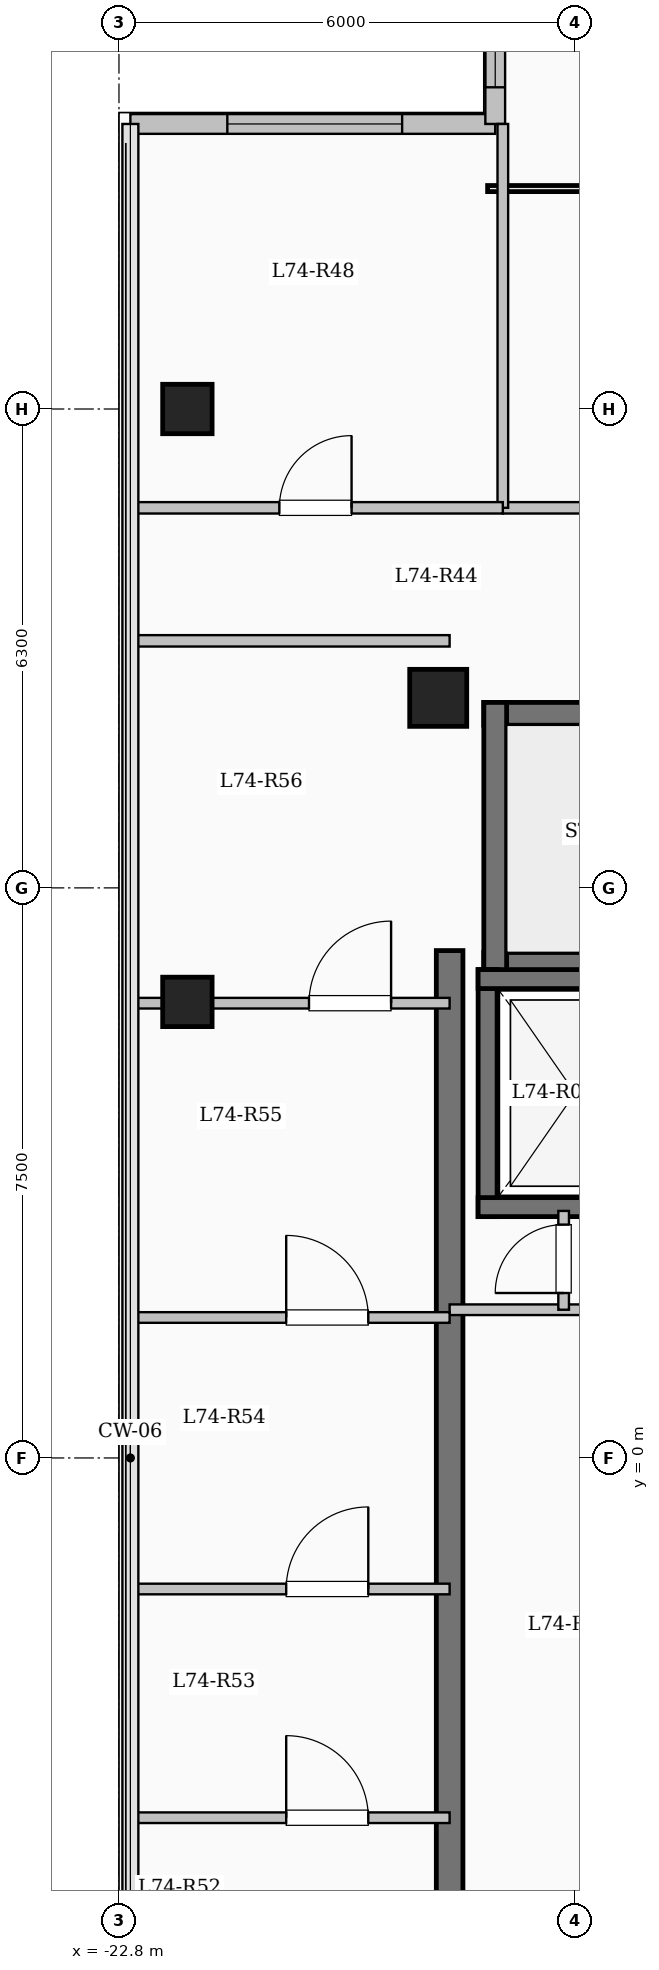
"""IFC4 building model, lengths in metres.
Left out: names, types, materials, properties, quantities, classifications, styles, units other than length and angle.
Written with IfcOpenShell. Run it as: python <this file> out.ifc"""

import sys

from ifc_helpers import new_model, si_unit, direction, frame, frame_2d, origin, origin_2d, place, context, subcontext, project, spatial, rectangle, extrude, element, fill, save


model = new_model("IFC4")
c1 = context("Model", 3, precision=1e-05, world=origin(), true_north=direction((0.0, 1.0)))
c2 = subcontext(c1, "Body", "Model", "MODEL_VIEW")
j1 = project(units=[si_unit("LENGTHUNIT", "METRE"), si_unit("PLANEANGLEUNIT", "RADIAN")], contexts=[c1])
p1 = place(None, origin())
s1 = spatial("IfcSite", under=j1, at=p1, CompositionType="ELEMENT")
p2 = place(p1, origin())
s2 = spatial("IfcBuilding", under=s1, at=p2, CompositionType="ELEMENT")
p3 = place(p2, frame((0.0, 0.0, 271.65)))
s3 = spatial("IfcBuildingStorey", under=s2, at=p3, CompositionType="ELEMENT", Elevation=271.65)
p4 = place(p3, frame((-18.6, 10.0, 0.0), z_axis=(0.0, 0.0, 1.0), x_axis=(1.0, 0.0, 0.0)))
e1 = element("IfcColumn", 1, at=p4, inside=s3, PredefinedType="COLUMN", context=c2, shape_type="SweptSolid", body=[
    extrude(rectangle(XDim=0.75, YDim=0.75, at=origin_2d()), origin(), (0.0, 0.0, 1.0), 4.65),
])
for number, where, z_axis, x_axis in (
    (2, (-21.9, -6.0, 0.0), (0.0, 0.0, 1.0), (1.0, 0.0, 0.0)),
    (3, (-21.9, 6.0, 0.0), (0.0, 0.0, 1.0), (1.0, 0.0, 0.0)),
    (4, (-21.9, 13.8, 0.0), (0.0, 0.0, 1.0), (1.0, 0.0, 0.0)),
):
    element("IfcColumn", number, at=place(p3, frame(where, z_axis=z_axis, x_axis=x_axis)), inside=s3, PredefinedType="COLUMN", context=c2, shape_type="SweptSolid", body=[
        extrude(rectangle(XDim=0.65, YDim=0.65, at=origin_2d()), origin(), (0.0, 0.0, 1.0), 4.65),
    ])
p5 = place(p3, frame((-22.65, 17.55, 0.0), z_axis=(0.0, 0.0, 1.0), x_axis=(1.0, 0.0, 0.0)))
e5 = element("IfcWall", 5, at=p5, inside=s3, PredefinedType="SOLIDWALL", context=c2, shape_type="SweptSolid", body=[
    extrude(rectangle(XDim=4.8, YDim=0.26, at=frame_2d((2.4, 0.0))), origin(), (0.0, 0.0, 1.0), 4.35),
])
p6 = place(p5, frame((1.275, 0.0, 0.85)))
e6 = element("IfcOpeningElement", 6, at=p6, cuts=e5, PredefinedType="OPENING", context=c2, shape_type="SweptSolid", body=[
    extrude(rectangle(XDim=2.3, YDim=2.2, at=frame_2d((1.15, 1.1))), frame((0.0, 0.14, 0.0), z_axis=(0.0, -1.0, 0.0), x_axis=(1.0, 0.0, 0.0)), (0.0, 0.0, 1.0), 0.28),
])
p7 = place(p3, frame((-17.85, 17.55, 0.0), z_axis=(0.0, 0.0, 1.0), x_axis=(0.0, 1.0, 0.0)))
e7 = element("IfcWall", 7, at=p7, inside=s3, PredefinedType="SOLIDWALL", context=c2, shape_type="SweptSolid", body=[
    extrude(rectangle(XDim=3.3, YDim=0.26, at=frame_2d((1.65, 0.0))), origin(), (0.0, 0.0, 1.0), 4.35),
])
p8 = place(p7, frame((0.482, 0.0, 0.85)))
e8 = element("IfcOpeningElement", 8, at=p8, cuts=e7, PredefinedType="OPENING", context=c2, shape_type="SweptSolid", body=[
    extrude(rectangle(XDim=2.3, YDim=2.2, at=frame_2d((1.15, 1.1))), frame((0.0, 0.14, 0.0), z_axis=(0.0, -1.0, 0.0), x_axis=(1.0, 0.0, 0.0)), (0.0, 0.0, 1.0), 0.28),
])
p9 = place(p3, frame((-18.0, 9.79, 0.0), z_axis=(0.0, 0.0, 1.0), x_axis=(1.0, 0.0, 0.0)))
e9 = element("IfcWall", 9, at=p9, inside=s3, PredefinedType="SHEAR", context=c2, shape_type="SweptSolid", body=[
    extrude(rectangle(XDim=8.0, YDim=0.3, at=frame_2d((4.0, 0.0))), origin(), (0.0, 0.0, 1.0), 4.65),
])
p10 = place(p3, frame((-18.0, 6.5, 0.0), z_axis=(0.0, 0.0, 1.0), x_axis=(1.0, 0.0, 0.0)))
e10 = element("IfcWall", 10, at=p10, inside=s3, PredefinedType="SHEAR", context=c2, shape_type="SweptSolid", body=[
    extrude(rectangle(XDim=8.0, YDim=0.3, at=frame_2d((4.0, 0.0))), origin(), (0.0, 0.0, 1.0), 4.65),
])
p11 = place(p10, frame((6.45, 0.0, 0.0)))
e11 = element("IfcOpeningElement", 11, at=p11, cuts=e10, PredefinedType="OPENING", context=c2, shape_type="SweptSolid", body=[
    extrude(rectangle(XDim=1.0, YDim=2.15, at=frame_2d((0.5, 1.075))), frame((0.0, 0.16, 0.0), z_axis=(0.0, -1.0, 0.0), x_axis=(1.0, 0.0, 0.0)), (0.0, 0.0, 1.0), 0.32),
])
p12 = place(p3, frame((-17.85, 6.35, 0.0), z_axis=(0.0, 0.0, 1.0), x_axis=(0.0, 1.0, 0.0)))
e12 = element("IfcWall", 12, at=p12, inside=s3, PredefinedType="SHEAR", context=c2, shape_type="SweptSolid", body=[
    extrude(rectangle(XDim=3.59, YDim=0.3, at=frame_2d((1.795, 0.0))), origin(), (0.0, 0.0, 1.0), 4.65),
])
p13 = place(p3, frame((-17.95, 3.175, 0.0), z_axis=(0.0, 0.0, 1.0), x_axis=(0.0, 1.0, 0.0)))
e13 = element("IfcWall", 13, at=p13, inside=s3, PredefinedType="SHEAR", context=c2, shape_type="SweptSolid", body=[
    extrude(rectangle(XDim=3.25, YDim=0.25, at=frame_2d((1.625, 0.0))), origin(), (0.0, 0.0, 1.0), 4.65),
])
for number, where, z_axis, x_axis in (
    (14, (-18.075, 3.3, 0.0), (0.0, 0.0, 1.0), (1.0, 0.0, 0.0)),
    (15, (-18.075, 6.3, 0.0), (0.0, 0.0, 1.0), (1.0, 0.0, 0.0)),
):
    element("IfcWall", number, at=place(p3, frame(where, z_axis=z_axis, x_axis=x_axis)), inside=s3, PredefinedType="SHEAR", context=c2, shape_type="SweptSolid", body=[
        extrude(rectangle(XDim=2.55, YDim=0.25, at=frame_2d((1.275, 0.0))), origin(), (0.0, 0.0, 1.0), 4.65),
    ])
p14 = place(p3, frame((-18.45, -7.375, 0.0), z_axis=(0.0, 0.0, 1.0), x_axis=(0.0, 1.0, 0.0)))
e16 = element("IfcWall", 16, at=p14, inside=s3, PredefinedType="SHEAR", context=c2, shape_type="SweptSolid", body=[
    extrude(rectangle(XDim=14.05, YDim=0.35, at=frame_2d((7.025, 0.0))), origin(), (0.0, 0.0, 1.0), 4.65),
])
p15 = place(p3, frame((-18.45, 1.95, 0.0), z_axis=(0.0, 0.0, 1.0), x_axis=(1.0, 0.0, 0.0)))
e17 = element("IfcWall", 17, at=p15, inside=s3, PredefinedType="PARTITIONING", context=c2, shape_type="SweptSolid", body=[
    extrude(rectangle(XDim=3.15, YDim=0.14, at=frame_2d((1.575, 0.0))), origin(), (0.0, 0.0, 1.0), 4.35),
])
p16 = place(p15, frame((1.9, 0.0, 0.0)))
e18 = element("IfcOpeningElement", 18, at=p16, cuts=e17, PredefinedType="OPENING", context=c2, shape_type="SweptSolid", body=[
    extrude(rectangle(XDim=0.9, YDim=2.08, at=frame_2d((0.45, 1.04))), frame((0.0, 0.08, 0.0), z_axis=(0.0, -1.0, 0.0), x_axis=(1.0, 0.0, 0.0)), (0.0, 0.0, 1.0), 0.16),
])
p17 = place(p3, frame((-16.95, 1.95, 0.0), z_axis=(0.0, 0.0, 1.0), x_axis=(0.0, 1.0, 0.0)))
e19 = element("IfcWall", 19, at=p17, inside=s3, PredefinedType="PARTITIONING", context=c2, shape_type="SweptSolid", body=[
    extrude(rectangle(XDim=1.3, YDim=0.14, at=frame_2d((0.65, 0.0))), origin(), (0.0, 0.0, 1.0), 4.35),
])
p18 = place(p17, frame((0.22, 0.0, 0.0)))
e20 = element("IfcOpeningElement", 20, at=p18, cuts=e19, PredefinedType="OPENING", context=c2, shape_type="SweptSolid", body=[
    extrude(rectangle(XDim=0.9, YDim=2.08, at=frame_2d((0.45, 1.04))), frame((0.0, 0.08, 0.0), z_axis=(0.0, -1.0, 0.0), x_axis=(1.0, 0.0, 0.0)), (0.0, 0.0, 1.0), 0.16),
])
p19 = place(p3, frame((-17.75, 12.5, 0.0), z_axis=(0.0, 0.0, 1.0), x_axis=(1.0, 0.0, 0.0)))
e21 = element("IfcWall", 21, at=p19, inside=s3, PredefinedType="PARTITIONING", context=c2, shape_type="SweptSolid", body=[
    extrude(rectangle(XDim=13.9, YDim=0.15, at=frame_2d((6.95, 0.0))), origin(), (0.0, 0.0, 1.0), 4.35),
])
p20 = place(p19, frame((1.2, 0.0, 0.0)))
e22 = element("IfcOpeningElement", 22, at=p20, cuts=e21, PredefinedType="OPENING", context=c2, shape_type="SweptSolid", body=[
    extrude(rectangle(XDim=1.2, YDim=2.15, at=frame_2d((0.6, 1.075))), frame((0.0, 0.085, 0.0), z_axis=(0.0, -1.0, 0.0), x_axis=(1.0, 0.0, 0.0)), (0.0, 0.0, 1.0), 0.17),
])
p21 = place(p19, frame((7.931, 0.0, 0.0)))
e23 = element("IfcOpeningElement", 23, at=p21, cuts=e21, PredefinedType="OPENING", context=c2, shape_type="SweptSolid", body=[
    extrude(rectangle(XDim=1.08, YDim=2.15, at=frame_2d((0.54, 1.075))), frame((0.0, 0.085, 0.0), z_axis=(0.0, -1.0, 0.0), x_axis=(1.0, 0.0, 0.0)), (0.0, 0.0, 1.0), 0.17),
])
p22 = place(p3, frame((-22.68, 10.75, 0.0), z_axis=(0.0, 0.0, 1.0), x_axis=(1.0, 0.0, 0.0)))
e24 = element("IfcWall", 24, at=p22, inside=s3, PredefinedType="PARTITIONING", context=c2, shape_type="SweptSolid", body=[
    extrude(rectangle(XDim=4.23, YDim=0.15, at=frame_2d((2.115, 0.0))), origin(), (0.0, 0.0, 1.0), 4.35),
])
p23 = place(p3, frame((-17.75, 12.5, 0.0), z_axis=(0.0, 0.0, 1.0), x_axis=(0.0, 1.0, 0.0)))
e25 = element("IfcWall", 25, at=p23, inside=s3, PredefinedType="PARTITIONING", context=c2, shape_type="SweptSolid", body=[
    extrude(rectangle(XDim=5.05, YDim=0.14, at=frame_2d((2.525, 0.0))), origin(), (0.0, 0.0, 1.0), 4.35),
])
p24 = place(p3, frame((-22.68, 12.5, 0.0), z_axis=(0.0, 0.0, 1.0), x_axis=(1.0, 0.0, 0.0)))
e26 = element("IfcWall", 26, at=p24, inside=s3, PredefinedType="PARTITIONING", context=c2, shape_type="SweptSolid", body=[
    extrude(rectangle(XDim=4.93, YDim=0.15, at=frame_2d((2.465, 0.0))), origin(), (0.0, 0.0, 1.0), 4.35),
])
p25 = place(p24, frame((1.99, 0.0, 0.0)))
e27 = element("IfcOpeningElement", 27, at=p25, cuts=e26, PredefinedType="OPENING", context=c2, shape_type="SweptSolid", body=[
    extrude(rectangle(XDim=0.95, YDim=2.15, at=frame_2d((0.475, 1.075))), frame((0.0, 0.085, 0.0), z_axis=(0.0, -1.0, 0.0), x_axis=(1.0, 0.0, 0.0)), (0.0, 0.0, 1.0), 0.17),
])
p26 = place(p3, frame((-22.68, -4.733, 0.0), z_axis=(0.0, 0.0, 1.0), x_axis=(1.0, 0.0, 0.0)))
e28 = element("IfcWall", 28, at=p26, inside=s3, PredefinedType="PARTITIONING", context=c2, shape_type="SweptSolid", body=[
    extrude(rectangle(XDim=4.23, YDim=0.14, at=frame_2d((2.115, 0.0))), origin(), (0.0, 0.0, 1.0), 4.35),
])
p27 = place(p26, frame((2.08, 0.0, 0.0)))
e29 = element("IfcOpeningElement", 29, at=p27, cuts=e28, PredefinedType="OPENING", context=c2, shape_type="SweptSolid", body=[
    extrude(rectangle(XDim=1.08, YDim=2.15, at=frame_2d((0.54, 1.075))), frame((0.0, 0.08, 0.0), z_axis=(0.0, -1.0, 0.0), x_axis=(1.0, 0.0, 0.0)), (0.0, 0.0, 1.0), 0.16),
])
p28 = place(p3, frame((-22.68, -1.724, 0.0), z_axis=(0.0, 0.0, 1.0), x_axis=(1.0, 0.0, 0.0)))
e30 = element("IfcWall", 30, at=p28, inside=s3, PredefinedType="PARTITIONING", context=c2, shape_type="SweptSolid", body=[
    extrude(rectangle(XDim=4.23, YDim=0.14, at=frame_2d((2.115, 0.0))), origin(), (0.0, 0.0, 1.0), 4.35),
])
p29 = place(p28, frame((2.08, 0.0, 0.0)))
e31 = element("IfcOpeningElement", 31, at=p29, cuts=e30, PredefinedType="OPENING", context=c2, shape_type="SweptSolid", body=[
    extrude(rectangle(XDim=1.08, YDim=2.15, at=frame_2d((0.54, 1.075))), frame((0.0, 0.08, 0.0), z_axis=(0.0, -1.0, 0.0), x_axis=(1.0, 0.0, 0.0)), (0.0, 0.0, 1.0), 0.16),
])
p30 = place(p3, frame((-22.68, 1.848, 0.0), z_axis=(0.0, 0.0, 1.0), x_axis=(1.0, 0.0, 0.0)))
e32 = element("IfcWall", 32, at=p30, inside=s3, PredefinedType="PARTITIONING", context=c2, shape_type="SweptSolid", body=[
    extrude(rectangle(XDim=4.23, YDim=0.14, at=frame_2d((2.115, 0.0))), origin(), (0.0, 0.0, 1.0), 4.35),
])
p31 = place(p30, frame((2.08, 0.0, 0.0)))
e33 = element("IfcOpeningElement", 33, at=p31, cuts=e32, PredefinedType="OPENING", context=c2, shape_type="SweptSolid", body=[
    extrude(rectangle(XDim=1.08, YDim=2.15, at=frame_2d((0.54, 1.075))), frame((0.0, 0.08, 0.0), z_axis=(0.0, -1.0, 0.0), x_axis=(1.0, 0.0, 0.0)), (0.0, 0.0, 1.0), 0.16),
])
p32 = place(p3, frame((-22.68, 5.983, 0.0), z_axis=(0.0, 0.0, 1.0), x_axis=(1.0, 0.0, 0.0)))
e34 = element("IfcWall", 34, at=p32, inside=s3, PredefinedType="PARTITIONING", context=c2, shape_type="SweptSolid", body=[
    extrude(rectangle(XDim=4.23, YDim=0.14, at=frame_2d((2.115, 0.0))), origin(), (0.0, 0.0, 1.0), 3.935),
])
p33 = place(p32, frame((2.38, 0.0, 0.0)))
e35 = element("IfcOpeningElement", 35, at=p33, cuts=e34, PredefinedType="OPENING", context=c2, shape_type="SweptSolid", body=[
    extrude(rectangle(XDim=1.08, YDim=2.15, at=frame_2d((0.54, 1.075))), frame((0.0, 0.08, 0.0), z_axis=(0.0, -1.0, 0.0), x_axis=(1.0, 0.0, 0.0)), (0.0, 0.0, 1.0), 0.16),
])
p34 = place(p6, origin())
e36 = element("IfcWindow", 36, at=p34, inside=s3, PartitioningType="SINGLE_PANEL", PredefinedType="WINDOW", context=c2, shape_type="SweptSolid", body=[
    extrude(rectangle(XDim=2.3, YDim=2.2, at=frame_2d((1.15, 1.1))), frame((0.0, 0.03, 0.0), z_axis=(0.0, -1.0, 0.0), x_axis=(1.0, 0.0, 0.0)), (0.0, 0.0, 1.0), 0.06),
])
fill(e6, e36)
p35 = place(p8, origin())
e37 = element("IfcWindow", 37, at=p35, inside=s3, PartitioningType="SINGLE_PANEL", PredefinedType="WINDOW", context=c2, shape_type="SweptSolid", body=[
    extrude(rectangle(XDim=2.3, YDim=2.2, at=frame_2d((1.15, 1.1))), frame((0.0, 0.03, 0.0), z_axis=(0.0, -1.0, 0.0), x_axis=(1.0, 0.0, 0.0)), (0.0, 0.0, 1.0), 0.06),
])
fill(e8, e37)
p36 = place(p18, origin())
e38 = element("IfcDoor", 38, at=p36, inside=s3, OperationType="SINGLE_SWING_LEFT", PredefinedType="DOOR", context=c2, shape_type="SweptSolid", body=[
    extrude(rectangle(XDim=0.9, YDim=2.08, at=frame_2d((0.45, 1.04))), frame((0.0, 0.025, 0.0), z_axis=(0.0, -1.0, 0.0), x_axis=(1.0, 0.0, 0.0)), (0.0, 0.0, 1.0), 0.05),
])
fill(e20, e38)
p37 = place(p25, origin())
e39 = element("IfcDoor", 39, at=p37, inside=s3, OperationType="SINGLE_SWING_RIGHT", PredefinedType="DOOR", context=c2, shape_type="SweptSolid", body=[
    extrude(rectangle(XDim=0.95, YDim=2.15, at=frame_2d((0.475, 1.075))), frame((0.0, 0.025, 0.0), z_axis=(0.0, -1.0, 0.0), x_axis=(1.0, 0.0, 0.0)), (0.0, 0.0, 1.0), 0.05),
])
fill(e27, e39)
p38 = place(p27, origin())
e40 = element("IfcDoor", 40, at=p38, inside=s3, OperationType="SINGLE_SWING_LEFT", PredefinedType="DOOR", context=c2, shape_type="SweptSolid", body=[
    extrude(rectangle(XDim=1.08, YDim=2.15, at=frame_2d((0.54, 1.075))), frame((0.0, 0.025, 0.0), z_axis=(0.0, -1.0, 0.0), x_axis=(1.0, 0.0, 0.0)), (0.0, 0.0, 1.0), 0.05),
])
fill(e29, e40)
p39 = place(p29, origin())
e41 = element("IfcDoor", 41, at=p39, inside=s3, OperationType="SINGLE_SWING_RIGHT", PredefinedType="DOOR", context=c2, shape_type="SweptSolid", body=[
    extrude(rectangle(XDim=1.08, YDim=2.15, at=frame_2d((0.54, 1.075))), frame((0.0, 0.025, 0.0), z_axis=(0.0, -1.0, 0.0), x_axis=(1.0, 0.0, 0.0)), (0.0, 0.0, 1.0), 0.05),
])
fill(e31, e41)
p40 = place(p31, origin())
e42 = element("IfcDoor", 42, at=p40, inside=s3, OperationType="SINGLE_SWING_LEFT", PredefinedType="DOOR", context=c2, shape_type="SweptSolid", body=[
    extrude(rectangle(XDim=1.08, YDim=2.15, at=frame_2d((0.54, 1.075))), frame((0.0, 0.025, 0.0), z_axis=(0.0, -1.0, 0.0), x_axis=(1.0, 0.0, 0.0)), (0.0, 0.0, 1.0), 0.05),
])
fill(e33, e42)
p41 = place(p33, origin())
e43 = element("IfcDoor", 43, at=p41, inside=s3, OperationType="SINGLE_SWING_RIGHT", PredefinedType="DOOR", context=c2, shape_type="SweptSolid", body=[
    extrude(rectangle(XDim=1.08, YDim=2.15, at=frame_2d((0.54, 1.075))), frame((0.0, 0.025, 0.0), z_axis=(0.0, -1.0, 0.0), x_axis=(1.0, 0.0, 0.0)), (0.0, 0.0, 1.0), 0.05),
])
fill(e35, e43)
save(model, sys.argv[1])
